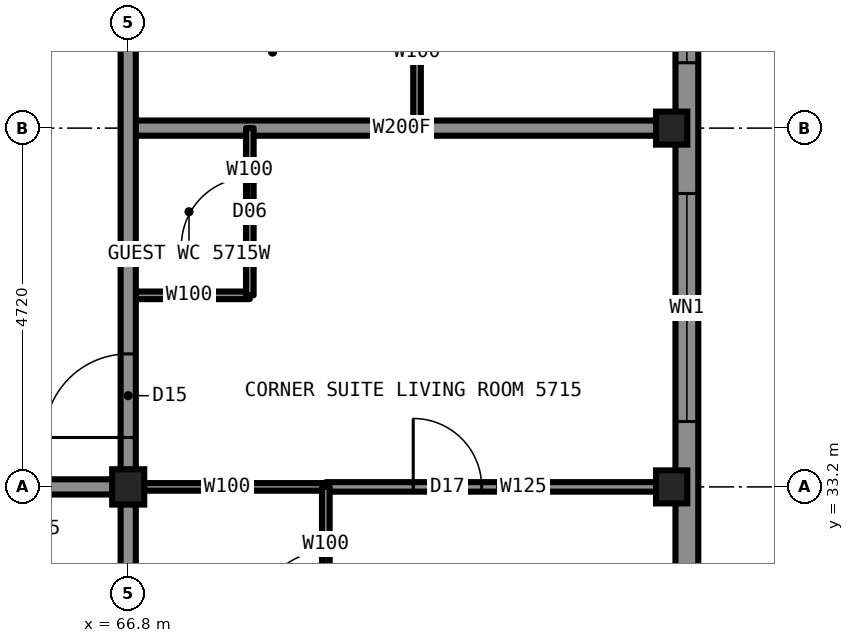
"""IFC4 building model, lengths in metres.
Left out: names, types, materials, properties, quantities, classifications, styles, units other than length and angle.
Written with IfcOpenShell. Run it as: python <this file> out.ifc"""

import sys

from ifc_helpers import new_model, si_unit, direction, frame, frame_2d, origin, origin_2d, place, context, subcontext, project, spatial, rectangle, i_section, extrude, element, fill, save


model = new_model("IFC4")
c1 = context("Model", 3, precision=1e-05, world=origin(), true_north=direction((0.0, 1.0)))
c2 = subcontext(c1, "Body", "Model", "MODEL_VIEW")
j1 = project(units=[si_unit("LENGTHUNIT", "METRE"), si_unit("PLANEANGLEUNIT", "RADIAN")], contexts=[c1])
p1 = place(None, origin())
s1 = spatial("IfcSite", under=j1, at=p1, CompositionType="ELEMENT")
p2 = place(p1, origin())
s2 = spatial("IfcBuilding", under=s1, at=p2, CompositionType="ELEMENT")
p3 = place(p2, frame((0.0, 0.0, 203.8)))
s3 = spatial("IfcBuildingStorey", under=s2, at=p3, CompositionType="ELEMENT", Elevation=203.8)
for number, where, z_axis, x_axis in (
    (1, (73.95, 33.2, 0.0), (0.0, 0.0, 1.0), (1.0, 0.0, 0.0)),
    (2, (73.95, 37.92, 0.0), (0.0, 0.0, 1.0), (1.0, 0.0, 0.0)),
):
    element("IfcColumn", number, at=place(p3, frame(where, z_axis=z_axis, x_axis=x_axis)), inside=s3, PredefinedType="COLUMN", context=c2, shape_type="SweptSolid", body=[
        extrude(i_section(OverallWidth=0.411, OverallDepth=0.434, WebThickness=0.036, FlangeThickness=0.057, at=origin_2d()), origin(), (0.0, 0.0, 1.0), 3.5),
    ])
p4 = place(p3, frame((66.8, 33.2, 0.0), z_axis=(0.0, 0.0, 1.0), x_axis=(1.0, 0.0, 0.0)))
e3 = element("IfcColumn", 3, at=p4, inside=s3, PredefinedType="COLUMN", context=c2, shape_type="SweptSolid", body=[
    extrude(i_section(OverallWidth=0.422, OverallDepth=0.465, WebThickness=0.045, FlangeThickness=0.073, at=origin_2d()), origin(), (0.0, 0.0, 1.0), 3.5),
])
p5 = place(p3, frame((66.8, 33.2, 0.0), z_axis=(0.0, 0.0, 1.0), x_axis=(1.0, 0.0, 0.0)))
e4 = element("IfcWall", 4, at=p5, inside=s3, PredefinedType="PARTITIONING", context=c2, shape_type="SweptSolid", body=[
    extrude(rectangle(XDim=2.6, YDim=0.1, at=frame_2d((1.3, 0.0))), origin(), (0.0, 0.0, 1.0), 2.573),
])
p6 = place(p3, frame((43.2, 33.2, 0.0), z_axis=(0.0, 0.0, 1.0), x_axis=(1.0, 0.0, 0.0)))
e5 = element("IfcWall", 5, at=p6, inside=s3, PredefinedType="PARTITIONING", context=c2, shape_type="SweptSolid", body=[
    extrude(rectangle(XDim=23.6, YDim=0.2, at=frame_2d((11.8, 0.0))), origin(), (0.0, 0.0, 1.0), 3.33),
])
p7 = place(p6, frame((2.55, 0.0, 0.0)))
e6 = element("IfcOpeningElement", 6, at=p7, cuts=e5, PredefinedType="OPENING", context=c2, shape_type="SweptSolid", body=[
    extrude(rectangle(XDim=1.0, YDim=2.2, at=frame_2d((0.5, 1.1))), frame((0.0, 0.11, 0.0), z_axis=(0.0, -1.0, 0.0), x_axis=(1.0, 0.0, 0.0)), (0.0, 0.0, 1.0), 0.22),
])
p8 = place(p6, frame((6.57, 0.0, 0.0)))
e7 = element("IfcOpeningElement", 7, at=p8, cuts=e5, PredefinedType="OPENING", context=c2, shape_type="SweptSolid", body=[
    extrude(rectangle(XDim=1.1, YDim=2.2, at=frame_2d((0.55, 1.1))), frame((0.0, 0.11, 0.0), z_axis=(0.0, -1.0, 0.0), x_axis=(1.0, 0.0, 0.0)), (0.0, 0.0, 1.0), 0.22),
])
p9 = place(p6, frame((21.14, 0.0, 0.0)))
e8 = element("IfcOpeningElement", 8, at=p9, cuts=e5, PredefinedType="OPENING", context=c2, shape_type="SweptSolid", body=[
    extrude(rectangle(XDim=1.0, YDim=2.2, at=frame_2d((0.5, 1.1))), frame((0.0, 0.11, 0.0), z_axis=(0.0, -1.0, 0.0), x_axis=(1.0, 0.0, 0.0)), (0.0, 0.0, 1.0), 0.22),
])
p10 = place(p3, frame((69.4, 33.2, 0.0), z_axis=(0.0, 0.0, 1.0), x_axis=(1.0, 0.0, 0.0)))
e9 = element("IfcWall", 9, at=p10, inside=s3, PredefinedType="PARTITIONING", context=c2, shape_type="SweptSolid", body=[
    extrude(rectangle(XDim=4.6, YDim=0.125, at=frame_2d((2.3, 0.0))), origin(), (0.0, 0.0, 1.0), 2.573),
])
p11 = place(p10, frame((1.15, 0.0, 0.0)))
e10 = element("IfcOpeningElement", 10, at=p11, cuts=e9, PredefinedType="OPENING", context=c2, shape_type="SweptSolid", body=[
    extrude(rectangle(XDim=0.9, YDim=2.2, at=frame_2d((0.45, 1.1))), frame((0.0, 0.073, 0.0), z_axis=(0.0, -1.0, 0.0), x_axis=(1.0, 0.0, 0.0)), (0.0, 0.0, 1.0), 0.145),
])
p12 = place(p3, frame((66.8, 37.92, 0.0), z_axis=(0.0, 0.0, 1.0), x_axis=(1.0, 0.0, 0.0)))
e11 = element("IfcWall", 11, at=p12, inside=s3, PredefinedType="PARTITIONING", context=c2, shape_type="SweptSolid", body=[
    extrude(rectangle(XDim=7.2, YDim=0.2, at=frame_2d((3.6, 0.0))), origin(), (0.0, 0.0, 1.0), 2.573),
])
p13 = place(p3, frame((66.8, 35.72, 0.0), z_axis=(0.0, 0.0, 1.0), x_axis=(1.0, 0.0, 0.0)))
e12 = element("IfcWall", 12, at=p13, inside=s3, PredefinedType="PARTITIONING", context=c2, shape_type="SweptSolid", body=[
    extrude(rectangle(XDim=1.6, YDim=0.1, at=frame_2d((0.8, 0.0))), origin(), (0.0, 0.0, 1.0), 3.33),
])
p14 = place(p3, frame((66.8, 33.2, 0.0), z_axis=(0.0, 0.0, 1.0), x_axis=(0.0, 1.0, 0.0)))
e13 = element("IfcWall", 13, at=p14, inside=s3, PredefinedType="PARTITIONING", context=c2, shape_type="SweptSolid", body=[
    extrude(rectangle(XDim=23.58, YDim=0.2, at=frame_2d((11.79, 0.0))), origin(), (0.0, 0.0, 1.0), 3.33),
])
p15 = place(p14, frame((6.98, 0.0, 0.0)))
e14 = element("IfcOpeningElement", 14, at=p15, cuts=e13, PredefinedType="OPENING", context=c2, shape_type="SweptSolid", body=[
    extrude(rectangle(XDim=1.0, YDim=2.2, at=frame_2d((0.5, 1.1))), frame((0.0, 0.11, 0.0), z_axis=(0.0, -1.0, 0.0), x_axis=(1.0, 0.0, 0.0)), (0.0, 0.0, 1.0), 0.22),
])
p16 = place(p14, frame((11.7, 0.0, 0.0)))
e15 = element("IfcOpeningElement", 15, at=p16, cuts=e13, PredefinedType="OPENING", context=c2, shape_type="SweptSolid", body=[
    extrude(rectangle(XDim=1.0, YDim=2.2, at=frame_2d((0.5, 1.1))), frame((0.0, 0.11, 0.0), z_axis=(0.0, -1.0, 0.0), x_axis=(1.0, 0.0, 0.0)), (0.0, 0.0, 1.0), 0.22),
])
p17 = place(p14, frame((15.62, 0.0, 0.0)))
e16 = element("IfcOpeningElement", 16, at=p17, cuts=e13, PredefinedType="OPENING", context=c2, shape_type="SweptSolid", body=[
    extrude(rectangle(XDim=1.0, YDim=2.2, at=frame_2d((0.5, 1.1))), frame((0.0, 0.11, 0.0), z_axis=(0.0, -1.0, 0.0), x_axis=(1.0, 0.0, 0.0)), (0.0, 0.0, 1.0), 0.22),
])
p18 = place(p14, frame((22.05, 0.0, 0.0)))
e17 = element("IfcOpeningElement", 17, at=p18, cuts=e13, PredefinedType="OPENING", context=c2, shape_type="SweptSolid", body=[
    extrude(rectangle(XDim=1.1, YDim=2.2, at=frame_2d((0.55, 1.1))), frame((0.0, 0.11, 0.0), z_axis=(0.0, -1.0, 0.0), x_axis=(1.0, 0.0, 0.0)), (0.0, 0.0, 1.0), 0.22),
])
p19 = place(p14, frame((0.65, 0.0, 0.0)))
e18 = element("IfcOpeningElement", 18, at=p19, cuts=e13, PredefinedType="OPENING", context=c2, shape_type="SweptSolid", body=[
    extrude(rectangle(XDim=1.1, YDim=2.2, at=frame_2d((0.55, 1.1))), frame((0.0, 0.11, 0.0), z_axis=(0.0, -1.0, 0.0), x_axis=(1.0, 0.0, 0.0)), (0.0, 0.0, 1.0), 0.22),
])
p20 = place(p3, frame((66.8, 26.0, 0.0), z_axis=(0.0, 0.0, 1.0), x_axis=(0.0, 1.0, 0.0)))
e19 = element("IfcWall", 19, at=p20, inside=s3, PredefinedType="PARTITIONING", context=c2, shape_type="SweptSolid", body=[
    extrude(rectangle(XDim=7.2, YDim=0.2, at=frame_2d((3.6, 0.0))), origin(), (0.0, 0.0, 1.0), 2.573),
])
p21 = place(p3, frame((68.4, 35.72, 0.0), z_axis=(0.0, 0.0, 1.0), x_axis=(0.0, 1.0, 0.0)))
e20 = element("IfcWall", 20, at=p21, inside=s3, PredefinedType="PARTITIONING", context=c2, shape_type="SweptSolid", body=[
    extrude(rectangle(XDim=2.2, YDim=0.1, at=frame_2d((1.1, 0.0))), origin(), (0.0, 0.0, 1.0), 3.33),
])
p22 = place(p21, frame((0.65, 0.0, 0.0)))
e21 = element("IfcOpeningElement", 21, at=p22, cuts=e20, PredefinedType="OPENING", context=c2, shape_type="SweptSolid", body=[
    extrude(rectangle(XDim=0.9, YDim=2.1, at=frame_2d((0.45, 1.05))), frame((0.0, 0.06, 0.0), z_axis=(0.0, -1.0, 0.0), x_axis=(1.0, 0.0, 0.0)), (0.0, 0.0, 1.0), 0.12),
])
p23 = place(p3, frame((69.4, 30.6, 0.0), z_axis=(0.0, 0.0, 1.0), x_axis=(0.0, 1.0, 0.0)))
e22 = element("IfcWall", 22, at=p23, inside=s3, PredefinedType="PARTITIONING", context=c2, shape_type="SweptSolid", body=[
    extrude(rectangle(XDim=2.6, YDim=0.1, at=frame_2d((1.3, 0.0))), origin(), (0.0, 0.0, 1.0), 3.33),
])
p24 = place(p23, frame((0.85, 0.0, 0.0)))
e23 = element("IfcOpeningElement", 23, at=p24, cuts=e22, PredefinedType="OPENING", context=c2, shape_type="SweptSolid", body=[
    extrude(rectangle(XDim=0.9, YDim=2.1, at=frame_2d((0.45, 1.05))), frame((0.0, 0.06, 0.0), z_axis=(0.0, -1.0, 0.0), x_axis=(1.0, 0.0, 0.0)), (0.0, 0.0, 1.0), 0.12),
])
p25 = place(p3, frame((70.6, 37.92, 0.0), z_axis=(0.0, 0.0, 1.0), x_axis=(0.0, 1.0, 0.0)))
e24 = element("IfcWall", 24, at=p25, inside=s3, PredefinedType="PARTITIONING", context=c2, shape_type="SweptSolid", body=[
    extrude(rectangle(XDim=2.0, YDim=0.1, at=frame_2d((1.0, 0.0))), origin(), (0.0, 0.0, 1.0), 3.33),
])
p26 = place(p3, frame((74.15, 31.2, 0.0), z_axis=(0.0, 0.0, 1.0), x_axis=(0.0, 1.0, 0.0)))
e25 = element("IfcWall", 25, at=p26, inside=s3, PredefinedType="SOLIDWALL", context=c2, shape_type="SweptSolid", body=[
    extrude(rectangle(XDim=27.6, YDim=0.3, at=frame_2d((13.8, 0.0))), origin(), (0.0, 0.0, 1.0), 2.83),
])
p27 = place(p26, frame((2.86, 0.0, 0.3)))
e26 = element("IfcOpeningElement", 26, at=p27, cuts=e25, PredefinedType="OPENING", context=c2, shape_type="SweptSolid", body=[
    extrude(rectangle(XDim=0.7, YDim=1.2, at=frame_2d((0.35, 0.6))), frame((0.0, 0.16, 0.0), z_axis=(0.0, -1.0, 0.0), x_axis=(1.0, 0.0, 0.0)), (0.0, 0.0, 1.0), 0.32),
])
p28 = place(p26, frame((7.58, 0.0, 0.3)))
e27 = element("IfcOpeningElement", 27, at=p28, cuts=e25, PredefinedType="OPENING", context=c2, shape_type="SweptSolid", body=[
    extrude(rectangle(XDim=3.0, YDim=2.0, at=frame_2d((1.5, 1.0))), frame((0.0, 0.16, 0.0), z_axis=(0.0, -1.0, 0.0), x_axis=(1.0, 0.0, 0.0)), (0.0, 0.0, 1.0), 0.32),
])
p29 = place(p26, frame((12.3, 0.0, 0.3)))
e28 = element("IfcOpeningElement", 28, at=p29, cuts=e25, PredefinedType="OPENING", context=c2, shape_type="SweptSolid", body=[
    extrude(rectangle(XDim=3.0, YDim=2.0, at=frame_2d((1.5, 1.0))), frame((0.0, 0.16, 0.0), z_axis=(0.0, -1.0, 0.0), x_axis=(1.0, 0.0, 0.0)), (0.0, 0.0, 1.0), 0.32),
])
p30 = place(p26, frame((17.02, 0.0, 0.3)))
e29 = element("IfcOpeningElement", 29, at=p30, cuts=e25, PredefinedType="OPENING", context=c2, shape_type="SweptSolid", body=[
    extrude(rectangle(XDim=3.0, YDim=2.0, at=frame_2d((1.5, 1.0))), frame((0.0, 0.16, 0.0), z_axis=(0.0, -1.0, 0.0), x_axis=(1.0, 0.0, 0.0)), (0.0, 0.0, 1.0), 0.32),
])
p31 = place(p26, frame((23.99, 0.0, 0.3)))
e30 = element("IfcOpeningElement", 30, at=p31, cuts=e25, PredefinedType="OPENING", context=c2, shape_type="SweptSolid", body=[
    extrude(rectangle(XDim=0.7, YDim=1.2, at=frame_2d((0.35, 0.6))), frame((0.0, 0.16, 0.0), z_axis=(0.0, -1.0, 0.0), x_axis=(1.0, 0.0, 0.0)), (0.0, 0.0, 1.0), 0.32),
])
p32 = place(p19, origin())
e31 = element("IfcDoor", 31, at=p32, inside=s3, OperationType="SINGLE_SWING_LEFT", PredefinedType="DOOR", context=c2, shape_type="SweptSolid", body=[
    extrude(rectangle(XDim=1.1, YDim=2.2, at=frame_2d((0.55, 1.1))), frame((0.0, 0.025, 0.0), z_axis=(0.0, -1.0, 0.0), x_axis=(1.0, 0.0, 0.0)), (0.0, 0.0, 1.0), 0.05),
])
fill(e18, e31)
p33 = place(p24, origin())
e32 = element("IfcDoor", 32, at=p33, inside=s3, OperationType="SINGLE_SWING_RIGHT", PredefinedType="DOOR", context=c2, shape_type="SweptSolid", body=[
    extrude(rectangle(XDim=0.9, YDim=2.1, at=frame_2d((0.45, 1.05))), frame((0.0, 0.025, 0.0), z_axis=(0.0, -1.0, 0.0), x_axis=(1.0, 0.0, 0.0)), (0.0, 0.0, 1.0), 0.05),
])
fill(e23, e32)
p34 = place(p11, origin())
e33 = element("IfcDoor", 33, at=p34, inside=s3, OperationType="SINGLE_SWING_LEFT", PredefinedType="DOOR", context=c2, shape_type="SweptSolid", body=[
    extrude(rectangle(XDim=0.9, YDim=2.2, at=frame_2d((0.45, 1.1))), frame((0.0, 0.025, 0.0), z_axis=(0.0, -1.0, 0.0), x_axis=(1.0, 0.0, 0.0)), (0.0, 0.0, 1.0), 0.05),
])
fill(e10, e33)
p35 = place(p22, origin())
e34 = element("IfcDoor", 34, at=p35, inside=s3, OperationType="SINGLE_SWING_LEFT", PredefinedType="DOOR", context=c2, shape_type="SweptSolid", body=[
    extrude(rectangle(XDim=0.9, YDim=2.1, at=frame_2d((0.45, 1.05))), frame((0.0, 0.025, 0.0), z_axis=(0.0, -1.0, 0.0), x_axis=(1.0, 0.0, 0.0)), (0.0, 0.0, 1.0), 0.05),
])
fill(e21, e34)
p36 = place(p27, origin())
e35 = element("IfcWindow", 35, at=p36, inside=s3, PartitioningType="SINGLE_PANEL", PredefinedType="WINDOW", context=c2, shape_type="SweptSolid", body=[
    extrude(rectangle(XDim=0.7, YDim=1.2, at=frame_2d((0.35, 0.6))), frame((0.0, 0.13, 0.0), z_axis=(0.0, -1.0, 0.0), x_axis=(1.0, 0.0, 0.0)), (0.0, 0.0, 1.0), 0.06),
])
fill(e26, e35)
p37 = place(p28, origin())
e36 = element("IfcWindow", 36, at=p37, inside=s3, PartitioningType="SINGLE_PANEL", PredefinedType="WINDOW", context=c2, shape_type="SweptSolid", body=[
    extrude(rectangle(XDim=3.0, YDim=2.0, at=frame_2d((1.5, 1.0))), frame((0.0, 0.13, 0.0), z_axis=(0.0, -1.0, 0.0), x_axis=(1.0, 0.0, 0.0)), (0.0, 0.0, 1.0), 0.06),
])
fill(e27, e36)
save(model, sys.argv[1])
